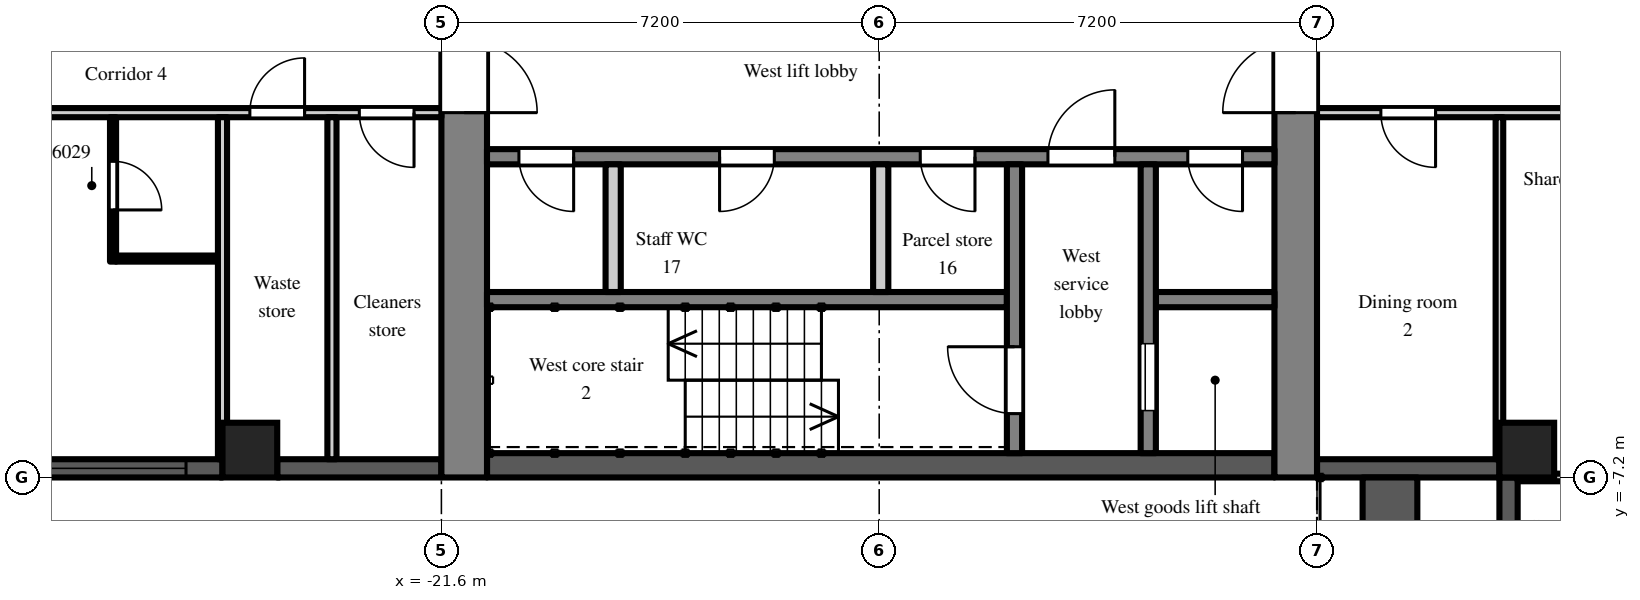
"""IFC4 building model, lengths in metres.
Left out: names, types, materials, properties, quantities, classifications, styles, units other than length and angle.
Written with IfcOpenShell. Run it as: python <this file> out.ifc"""

import sys

from ifc_helpers import new_model, si_unit, direction, frame, frame_2d, origin, origin_2d, place, context, subcontext, project, spatial, rectangle, extrude, element, fill, save


model = new_model("IFC4")
c1 = context("Model", 3, precision=1e-05, world=origin(), true_north=direction((0.0, 1.0)))
c2 = subcontext(c1, "Body", "Model", "MODEL_VIEW")
j1 = project(units=[si_unit("LENGTHUNIT", "METRE"), si_unit("PLANEANGLEUNIT", "RADIAN")], contexts=[c1])
p1 = place(None, origin())
s1 = spatial("IfcSite", under=j1, at=p1, CompositionType="ELEMENT")
p2 = place(p1, origin())
s2 = spatial("IfcBuilding", under=s1, at=p2, CompositionType="ELEMENT")
p3 = place(p2, frame((0.0, 0.0, 179.7)))
s3 = spatial("IfcBuildingStorey", under=s2, at=p3, CompositionType="ELEMENT", Elevation=179.7)
for number, where, z_axis, x_axis in (
    (1, (-24.75, -6.75, 0.0), (0.0, 0.0, 1.0), (1.0, 0.0, 0.0)),
    (2, (-3.75, -6.75, 0.0), (0.0, 0.0, 1.0), (1.0, 0.0, 0.0)),
):
    element("IfcColumn", number, at=place(p3, frame(where, z_axis=z_axis, x_axis=x_axis)), inside=s3, PredefinedType="COLUMN", context=c2, shape_type="SweptSolid", body=[
        extrude(rectangle(XDim=0.9, YDim=0.9, at=origin_2d()), origin(), (0.0, 0.0, 1.0), 3.0),
    ])
p4 = place(p3, frame((-28.35, -7.05, 0.0), z_axis=(0.0, 0.0, 1.0), x_axis=(1.0, 0.0, 0.0)))
e3 = element("IfcWall", 3, at=p4, inside=s3, PredefinedType="SOLIDWALL", context=c2, shape_type="SweptSolid", body=[
    extrude(rectangle(XDim=3.15, YDim=0.3, at=frame_2d((1.575, 0.0))), origin(), (0.0, 0.0, 1.0), 2.2),
])
p5 = place(p4, frame((0.15, 0.0, 0.2)))
e4 = element("IfcOpeningElement", 4, at=p5, cuts=e3, PredefinedType="OPENING", context=c2, shape_type="SweptSolid", body=[
    extrude(rectangle(XDim=2.4, YDim=1.85, at=frame_2d((1.2, 0.925))), frame((0.0, 0.16, 0.0), z_axis=(0.0, -1.0, 0.0), x_axis=(1.0, 0.0, 0.0)), (0.0, 0.0, 1.0), 0.32),
])
p6 = place(p3, frame((-24.3, -7.05, 0.0), z_axis=(0.0, 0.0, 1.0), x_axis=(1.0, 0.0, 0.0)))
e5 = element("IfcWall", 5, at=p6, inside=s3, PredefinedType="SOLIDWALL", context=c2, shape_type="SweptSolid", body=[
    extrude(rectangle(XDim=2.7, YDim=0.3, at=frame_2d((1.35, 0.0))), origin(), (0.0, 0.0, 1.0), 2.2),
])
p7 = place(p3, frame((-7.2, -7.05, 0.0), z_axis=(0.0, 0.0, 1.0), x_axis=(1.0, 0.0, 0.0)))
e6 = element("IfcWall", 6, at=p7, inside=s3, PredefinedType="SOLIDWALL", context=c2, shape_type="SweptSolid", body=[
    extrude(rectangle(XDim=3.0, YDim=0.3, at=frame_2d((1.5, 0.0))), origin(), (0.0, 0.0, 1.0), 2.2),
])
p8 = place(p3, frame((-4.05, -7.2, 0.0), z_axis=(0.0, 0.0, 1.0), x_axis=(0.0, -1.0, 0.0)))
e7 = element("IfcWall", 7, at=p8, inside=s3, PredefinedType="SOLIDWALL", context=c2, shape_type="SweptSolid", body=[
    extrude(rectangle(XDim=7.2, YDim=0.3, at=frame_2d((3.6, 0.0))), origin(), (0.0, 0.0, 1.0), 2.2),
])
p9 = place(p8, frame((3.0, 0.0, 0.0)))
e8 = element("IfcOpeningElement", 8, at=p9, cuts=e7, PredefinedType="OPENING", context=c2, shape_type="SweptSolid", body=[
    extrude(rectangle(XDim=1.2, YDim=2.05, at=frame_2d((0.6, 1.025))), frame((0.0, 0.16, 0.0), z_axis=(0.0, -1.0, 0.0), x_axis=(1.0, 0.0, 0.0)), (0.0, 0.0, 1.0), 0.32),
])
p10 = place(p8, frame((0.9, 0.0, 0.2)))
e9 = element("IfcOpeningElement", 9, at=p10, cuts=e7, PredefinedType="OPENING", context=c2, shape_type="SweptSolid", body=[
    extrude(rectangle(XDim=1.8, YDim=1.85, at=frame_2d((0.9, 0.925))), frame((0.0, 0.16, 0.0), z_axis=(0.0, -1.0, 0.0), x_axis=(1.0, 0.0, 0.0)), (0.0, 0.0, 1.0), 0.32),
])
p11 = place(p8, frame((4.5, 0.0, 0.2)))
e10 = element("IfcOpeningElement", 10, at=p11, cuts=e7, PredefinedType="OPENING", context=c2, shape_type="SweptSolid", body=[
    extrude(rectangle(XDim=1.8, YDim=1.85, at=frame_2d((0.9, 0.925))), frame((0.0, 0.16, 0.0), z_axis=(0.0, -1.0, 0.0), x_axis=(1.0, 0.0, 0.0)), (0.0, 0.0, 1.0), 0.32),
])
p12 = place(p3, frame((-6.0, -14.4, 0.0), z_axis=(0.0, 0.0, 1.0), x_axis=(0.0, 1.0, 0.0)))
e11 = element("IfcWall", 11, at=p12, inside=s3, PredefinedType="PARAPET", context=c2, shape_type="SweptSolid", body=[
    extrude(rectangle(XDim=7.2, YDim=0.9, at=frame_2d((3.6, 0.0))), origin(), (0.0, 0.0, 1.0), 0.8),
])
p13 = place(p3, frame((-7.55, -7.2, 0.0), z_axis=(0.0, 0.0, 1.0), x_axis=(0.0, 1.0, 0.0)))
e12 = element("IfcWall", 12, at=p13, inside=s3, PredefinedType="SHEAR", context=c2, shape_type="SweptSolid", body=[
    extrude(rectangle(XDim=14.4, YDim=0.7, at=frame_2d((7.2, 0.0))), origin(), (0.0, 0.0, 1.0), 2.6),
])
p14 = place(p13, frame((6.0, 0.0, 0.0)))
e13 = element("IfcOpeningElement", 13, at=p14, cuts=e12, PredefinedType="OPENING", context=c2, shape_type="SweptSolid", body=[
    extrude(rectangle(XDim=2.4, YDim=2.2, at=frame_2d((1.2, 1.1))), frame((0.0, 0.36, 0.0), z_axis=(0.0, -1.0, 0.0), x_axis=(1.0, 0.0, 0.0)), (0.0, 0.0, 1.0), 0.72),
])
p15 = place(p3, frame((-21.225, -7.2, 0.0), z_axis=(0.0, 0.0, 1.0), x_axis=(0.0, 1.0, 0.0)))
e14 = element("IfcWall", 14, at=p15, inside=s3, PredefinedType="SHEAR", context=c2, shape_type="SweptSolid", body=[
    extrude(rectangle(XDim=14.4, YDim=0.75, at=frame_2d((7.2, 0.0))), origin(), (0.0, 0.0, 1.0), 2.6),
])
p16 = place(p15, frame((6.0, 0.0, 0.0)))
e15 = element("IfcOpeningElement", 15, at=p16, cuts=e14, PredefinedType="OPENING", context=c2, shape_type="SweptSolid", body=[
    extrude(rectangle(XDim=2.4, YDim=2.2, at=frame_2d((1.2, 1.1))), frame((0.0, 0.385, 0.0), z_axis=(0.0, -1.0, 0.0), x_axis=(1.0, 0.0, 0.0)), (0.0, 0.0, 1.0), 0.77),
])
p17 = place(p3, frame((-7.9, -7.0, 0.0), z_axis=(0.0, 0.0, 1.0), x_axis=(-1.0, 0.0, 0.0)))
e16 = element("IfcWall", 16, at=p17, inside=s3, PredefinedType="SHEAR", context=c2, shape_type="SweptSolid", body=[
    extrude(rectangle(XDim=12.95, YDim=0.4, at=frame_2d((6.475, 0.0))), origin(), (0.0, 0.0, 1.0), 2.6),
])
p18 = place(p3, frame((-7.9, -1.925, 0.0), z_axis=(0.0, 0.0, 1.0), x_axis=(-1.0, 0.0, 0.0)))
e17 = element("IfcWall", 17, at=p18, inside=s3, PredefinedType="SHEAR", context=c2, shape_type="SweptSolid", body=[
    extrude(rectangle(XDim=12.95, YDim=0.25, at=frame_2d((6.475, 0.0))), origin(), (0.0, 0.0, 1.0), 2.6),
])
p19 = place(p18, frame((0.525, 0.0, 0.0)))
e18 = element("IfcOpeningElement", 18, at=p19, cuts=e17, PredefinedType="OPENING", context=c2, shape_type="SweptSolid", body=[
    extrude(rectangle(XDim=0.9, YDim=2.1, at=frame_2d((0.45, 1.05))), frame((0.0, 0.135, 0.0), z_axis=(0.0, -1.0, 0.0), x_axis=(1.0, 0.0, 0.0)), (0.0, 0.0, 1.0), 0.27),
])
p20 = place(p18, frame((2.625, 0.0, 0.0)))
e19 = element("IfcOpeningElement", 19, at=p20, cuts=e17, PredefinedType="OPENING", context=c2, shape_type="SweptSolid", body=[
    extrude(rectangle(XDim=1.1, YDim=2.1, at=frame_2d((0.55, 1.05))), frame((0.0, 0.135, 0.0), z_axis=(0.0, -1.0, 0.0), x_axis=(1.0, 0.0, 0.0)), (0.0, 0.0, 1.0), 0.27),
])
p21 = place(p18, frame((4.925, 0.0, 0.0)))
e20 = element("IfcOpeningElement", 20, at=p21, cuts=e17, PredefinedType="OPENING", context=c2, shape_type="SweptSolid", body=[
    extrude(rectangle(XDim=0.9, YDim=2.1, at=frame_2d((0.45, 1.05))), frame((0.0, 0.135, 0.0), z_axis=(0.0, -1.0, 0.0), x_axis=(1.0, 0.0, 0.0)), (0.0, 0.0, 1.0), 0.27),
])
p22 = place(p18, frame((8.225, 0.0, 0.0)))
e21 = element("IfcOpeningElement", 21, at=p22, cuts=e17, PredefinedType="OPENING", context=c2, shape_type="SweptSolid", body=[
    extrude(rectangle(XDim=0.9, YDim=2.1, at=frame_2d((0.45, 1.05))), frame((0.0, 0.135, 0.0), z_axis=(0.0, -1.0, 0.0), x_axis=(1.0, 0.0, 0.0)), (0.0, 0.0, 1.0), 0.27),
])
p23 = place(p18, frame((11.525, 0.0, 0.0)))
e22 = element("IfcOpeningElement", 22, at=p23, cuts=e17, PredefinedType="OPENING", context=c2, shape_type="SweptSolid", body=[
    extrude(rectangle(XDim=0.9, YDim=2.1, at=frame_2d((0.45, 1.05))), frame((0.0, 0.135, 0.0), z_axis=(0.0, -1.0, 0.0), x_axis=(1.0, 0.0, 0.0)), (0.0, 0.0, 1.0), 0.27),
])
p24 = place(p3, frame((-7.9, -4.275, 0.0), z_axis=(0.0, 0.0, 1.0), x_axis=(-1.0, 0.0, 0.0)))
e23 = element("IfcWall", 23, at=p24, inside=s3, PredefinedType="SHEAR", context=c2, shape_type="SweptSolid", body=[
    extrude(rectangle(XDim=1.95, YDim=0.25, at=frame_2d((0.975, 0.0))), origin(), (0.0, 0.0, 1.0), 2.6),
])
p25 = place(p3, frame((-12.3, -4.275, 0.0), z_axis=(0.0, 0.0, 1.0), x_axis=(-1.0, 0.0, 0.0)))
e24 = element("IfcWall", 24, at=p25, inside=s3, PredefinedType="SHEAR", context=c2, shape_type="SweptSolid", body=[
    extrude(rectangle(XDim=8.55, YDim=0.25, at=frame_2d((4.275, 0.0))), origin(), (0.0, 0.0, 1.0), 2.6),
])
p26 = place(p3, frame((-9.975, -2.05, 0.0), z_axis=(0.0, 0.0, 1.0), x_axis=(0.0, -1.0, 0.0)))
e25 = element("IfcWall", 25, at=p26, inside=s3, PredefinedType="SHEAR", context=c2, shape_type="SweptSolid", body=[
    extrude(rectangle(XDim=4.75, YDim=0.25, at=frame_2d((2.375, 0.0))), origin(), (0.0, 0.0, 1.0), 2.6),
])
p27 = place(p26, frame((2.95, 0.0, 0.0)))
e26 = element("IfcOpeningElement", 26, at=p27, cuts=e25, PredefinedType="OPENING", context=c2, shape_type="SweptSolid", body=[
    extrude(rectangle(XDim=1.1, YDim=2.1, at=frame_2d((0.55, 1.05))), frame((0.0, 0.135, 0.0), z_axis=(0.0, -1.0, 0.0), x_axis=(1.0, 0.0, 0.0)), (0.0, 0.0, 1.0), 0.27),
])
p28 = place(p3, frame((-12.175, -2.05, 0.0), z_axis=(0.0, 0.0, 1.0), x_axis=(0.0, -1.0, 0.0)))
e27 = element("IfcWall", 27, at=p28, inside=s3, PredefinedType="SHEAR", context=c2, shape_type="SweptSolid", body=[
    extrude(rectangle(XDim=4.75, YDim=0.25, at=frame_2d((2.375, 0.0))), origin(), (0.0, 0.0, 1.0), 2.6),
])
p29 = place(p28, frame((3.0, 0.0, 0.0)))
e28 = element("IfcOpeningElement", 28, at=p29, cuts=e27, PredefinedType="OPENING", context=c2, shape_type="SweptSolid", body=[
    extrude(rectangle(XDim=1.1, YDim=2.1, at=frame_2d((0.55, 1.05))), frame((0.0, 0.135, 0.0), z_axis=(0.0, -1.0, 0.0), x_axis=(1.0, 0.0, 0.0)), (0.0, 0.0, 1.0), 0.27),
])
for number, where, z_axis, x_axis in (
    (29, (-14.375, -2.05, 0.0), (0.0, 0.0, 1.0), (0.0, -1.0, 0.0)),
    (30, (-18.775, -2.05, 0.0), (0.0, 0.0, 1.0), (0.0, -1.0, 0.0)),
):
    element("IfcWall", number, at=place(p3, frame(where, z_axis=z_axis, x_axis=x_axis)), inside=s3, PredefinedType="PARTITIONING", context=c2, shape_type="SweptSolid", body=[
        extrude(rectangle(XDim=2.1, YDim=0.25, at=frame_2d((1.05, 0.0))), origin(), (0.0, 0.0, 1.0), 2.6),
    ])
p30 = place(p3, frame((-36.5, -1.2, 0.0), z_axis=(0.0, 0.0, 1.0), x_axis=(1.0, 0.0, 0.0)))
e31 = element("IfcWall", 31, at=p30, inside=s3, PredefinedType="PARTITIONING", context=c2, shape_type="SweptSolid", body=[
    extrude(rectangle(XDim=14.9, YDim=0.15, at=frame_2d((7.45, 0.0))), origin(), (0.0, 0.0, 1.0), 2.6),
])
p31 = place(p30, frame((13.55, 0.0, 0.0)))
e32 = element("IfcOpeningElement", 32, at=p31, cuts=e31, PredefinedType="OPENING", context=c2, shape_type="SweptSolid", body=[
    extrude(rectangle(XDim=0.9, YDim=2.1, at=frame_2d((0.45, 1.05))), frame((0.0, 0.085, 0.0), z_axis=(0.0, -1.0, 0.0), x_axis=(1.0, 0.0, 0.0)), (0.0, 0.0, 1.0), 0.17),
])
p32 = place(p30, frame((11.75, 0.0, 0.0)))
e33 = element("IfcOpeningElement", 33, at=p32, cuts=e31, PredefinedType="OPENING", context=c2, shape_type="SweptSolid", body=[
    extrude(rectangle(XDim=0.9, YDim=2.1, at=frame_2d((0.45, 1.05))), frame((0.0, 0.085, 0.0), z_axis=(0.0, -1.0, 0.0), x_axis=(1.0, 0.0, 0.0)), (0.0, 0.0, 1.0), 0.17),
])
p33 = place(p30, frame((4.41, 0.0, 0.0)))
e34 = element("IfcOpeningElement", 34, at=p33, cuts=e31, PredefinedType="OPENING", context=c2, shape_type="SweptSolid", body=[
    extrude(rectangle(XDim=1.0, YDim=2.1, at=frame_2d((0.5, 1.05))), frame((0.0, 0.085, 0.0), z_axis=(0.0, -1.0, 0.0), x_axis=(1.0, 0.0, 0.0)), (0.0, 0.0, 1.0), 0.17),
])
p34 = place(p30, frame((1.15, 0.0, 0.0)))
e35 = element("IfcOpeningElement", 35, at=p34, cuts=e31, PredefinedType="OPENING", context=c2, shape_type="SweptSolid", body=[
    extrude(rectangle(XDim=1.8, YDim=2.1, at=frame_2d((0.9, 1.05))), frame((0.0, 0.085, 0.0), z_axis=(0.0, -1.0, 0.0), x_axis=(1.0, 0.0, 0.0)), (0.0, 0.0, 1.0), 0.17),
])
p35 = place(p3, frame((-27.0, -3.65, 0.0), z_axis=(0.0, 0.0, 1.0), x_axis=(0.0, 1.0, 0.0)))
e36 = element("IfcWall", 36, at=p35, inside=s3, PredefinedType="PARTITIONING", context=c2, shape_type="SweptSolid", body=[
    extrude(rectangle(XDim=2.375, YDim=0.1, at=frame_2d((1.188, 0.0))), origin(), (0.0, 0.0, 1.0), 2.6),
])
p36 = place(p35, frame((0.85, 0.0, 0.0)))
e37 = element("IfcOpeningElement", 37, at=p36, cuts=e36, PredefinedType="OPENING", context=c2, shape_type="SweptSolid", body=[
    extrude(rectangle(XDim=0.8, YDim=2.1, at=frame_2d((0.4, 1.05))), frame((0.0, 0.06, 0.0), z_axis=(0.0, -1.0, 0.0), x_axis=(1.0, 0.0, 0.0)), (0.0, 0.0, 1.0), 0.12),
])
p37 = place(p3, frame((-26.95, -3.6, 0.0), z_axis=(0.0, 0.0, 1.0), x_axis=(1.0, 0.0, 0.0)))
e38 = element("IfcWall", 38, at=p37, inside=s3, PredefinedType="PARTITIONING", context=c2, shape_type="SweptSolid", body=[
    extrude(rectangle(XDim=1.675, YDim=0.1, at=frame_2d((0.837, 0.0))), origin(), (0.0, 0.0, 1.0), 2.6),
])
for number, where, z_axis, x_axis in (
    (39, (-25.2, -6.9, 0.0), (0.0, 0.0, 1.0), (0.0, 1.0, 0.0)),
    (40, (-23.4, -6.9, 0.0), (0.0, 0.0, 1.0), (0.0, 1.0, 0.0)),
):
    element("IfcWall", number, at=place(p3, frame(where, z_axis=z_axis, x_axis=x_axis)), inside=s3, PredefinedType="PARTITIONING", context=c2, shape_type="SweptSolid", body=[
        extrude(rectangle(XDim=5.625, YDim=0.15, at=frame_2d((2.812, 0.0))), origin(), (0.0, 0.0, 1.0), 2.6),
    ])
p38 = place(p3, frame((-7.2, -1.2, 0.0), z_axis=(0.0, 0.0, 1.0), x_axis=(1.0, 0.0, 0.0)))
e41 = element("IfcWall", 41, at=p38, inside=s3, PredefinedType="PARTITIONING", context=c2, shape_type="SweptSolid", body=[
    extrude(rectangle(XDim=6.075, YDim=0.15, at=frame_2d((3.038, 0.0))), origin(), (0.0, 0.0, 1.0), 2.6),
])
p39 = place(p38, frame((1.05, 0.0, 0.0)))
e42 = element("IfcOpeningElement", 42, at=p39, cuts=e41, PredefinedType="OPENING", context=c2, shape_type="SweptSolid", body=[
    extrude(rectangle(XDim=0.9, YDim=2.1, at=frame_2d((0.45, 1.05))), frame((0.0, 0.085, 0.0), z_axis=(0.0, -1.0, 0.0), x_axis=(1.0, 0.0, 0.0)), (0.0, 0.0, 1.0), 0.17),
])
p40 = place(p3, frame((-4.2, -6.9, 0.0), z_axis=(0.0, 0.0, 1.0), x_axis=(0.0, 1.0, 0.0)))
e43 = element("IfcWall", 43, at=p40, inside=s3, PredefinedType="PARTITIONING", context=c2, shape_type="SweptSolid", body=[
    extrude(rectangle(XDim=5.625, YDim=0.125, at=frame_2d((2.812, 0.0))), origin(), (0.0, 0.0, 1.0), 2.6),
])
p41 = place(p3, frame((-3.9, -7.2, 0.0), z_axis=(0.0, 0.0, 1.0), x_axis=(1.0, 0.0, 0.0)))
e44 = element("IfcWall", 44, at=p41, inside=s3, PredefinedType="PARTITIONING", context=c2, shape_type="SweptSolid", body=[
    extrude(rectangle(XDim=2.625, YDim=0.125, at=frame_2d((1.312, 0.0))), origin(), (0.0, 0.0, 1.0), 2.6),
])
p42 = place(p5, origin())
e45 = element("IfcWindow", 45, at=p42, inside=s3, PartitioningType="SINGLE_PANEL", PredefinedType="WINDOW", context=c2, shape_type="SweptSolid", body=[
    extrude(rectangle(XDim=2.4, YDim=1.85, at=frame_2d((1.2, 0.925))), frame((0.0, 0.03, 0.0), z_axis=(0.0, -1.0, 0.0), x_axis=(1.0, 0.0, 0.0)), (0.0, 0.0, 1.0), 0.06),
])
fill(e4, e45)
p43 = place(p27, origin())
e46 = element("IfcDoor", 46, at=p43, inside=s3, OperationType="SLIDING_TO_LEFT", PredefinedType="DOOR", context=c2, shape_type="SweptSolid", body=[
    extrude(rectangle(XDim=1.1, YDim=2.1, at=frame_2d((0.55, 1.05))), frame((0.0, 0.025, 0.0), z_axis=(0.0, -1.0, 0.0), x_axis=(1.0, 0.0, 0.0)), (0.0, 0.0, 1.0), 0.05),
])
fill(e26, e46)
p44 = place(p29, frame((1.1, 0.0, 0.0), z_axis=(0.0, 0.0, 1.0), x_axis=(-1.0, 0.0, 0.0)))
e47 = element("IfcDoor", 47, at=p44, inside=s3, OperationType="SINGLE_SWING_RIGHT", PredefinedType="DOOR", context=c2, shape_type="SweptSolid", body=[
    extrude(rectangle(XDim=1.1, YDim=2.1, at=frame_2d((0.55, 1.05))), frame((0.0, 0.025, 0.0), z_axis=(0.0, -1.0, 0.0), x_axis=(1.0, 0.0, 0.0)), (0.0, 0.0, 1.0), 0.05),
])
fill(e28, e47)
p45 = place(p19, origin())
e48 = element("IfcDoor", 48, at=p45, inside=s3, OperationType="SINGLE_SWING_LEFT", PredefinedType="DOOR", context=c2, shape_type="SweptSolid", body=[
    extrude(rectangle(XDim=0.9, YDim=2.1, at=frame_2d((0.45, 1.05))), frame((0.0, 0.025, 0.0), z_axis=(0.0, -1.0, 0.0), x_axis=(1.0, 0.0, 0.0)), (0.0, 0.0, 1.0), 0.05),
])
fill(e18, e48)
p46 = place(p20, frame((1.1, 0.0, 0.0), z_axis=(0.0, 0.0, 1.0), x_axis=(-1.0, 0.0, 0.0)))
e49 = element("IfcDoor", 49, at=p46, inside=s3, OperationType="SINGLE_SWING_RIGHT", PredefinedType="DOOR", context=c2, shape_type="SweptSolid", body=[
    extrude(rectangle(XDim=1.1, YDim=2.1, at=frame_2d((0.55, 1.05))), frame((0.0, 0.025, 0.0), z_axis=(0.0, -1.0, 0.0), x_axis=(1.0, 0.0, 0.0)), (0.0, 0.0, 1.0), 0.05),
])
fill(e19, e49)
p47 = place(p14, origin())
e50 = element("IfcDoor", 50, at=p47, inside=s3, OperationType="DOUBLE_DOOR_DOUBLE_SWING", PredefinedType="DOOR", context=c2, shape_type="SweptSolid", body=[
    extrude(rectangle(XDim=2.4, YDim=2.2, at=frame_2d((1.2, 1.1))), frame((0.0, 0.025, 0.0), z_axis=(0.0, -1.0, 0.0), x_axis=(1.0, 0.0, 0.0)), (0.0, 0.0, 1.0), 0.05),
])
fill(e13, e50)
p48 = place(p16, frame((2.4, 0.0, 0.0), z_axis=(0.0, 0.0, 1.0), x_axis=(-1.0, 0.0, 0.0)))
e51 = element("IfcDoor", 51, at=p48, inside=s3, OperationType="DOUBLE_DOOR_DOUBLE_SWING", PredefinedType="DOOR", context=c2, shape_type="SweptSolid", body=[
    extrude(rectangle(XDim=2.4, YDim=2.2, at=frame_2d((1.2, 1.1))), frame((0.0, 0.025, 0.0), z_axis=(0.0, -1.0, 0.0), x_axis=(1.0, 0.0, 0.0)), (0.0, 0.0, 1.0), 0.05),
])
fill(e15, e51)
p49 = place(p21, origin())
e52 = element("IfcDoor", 52, at=p49, inside=s3, OperationType="SINGLE_SWING_LEFT", PredefinedType="DOOR", context=c2, shape_type="SweptSolid", body=[
    extrude(rectangle(XDim=0.9, YDim=2.1, at=frame_2d((0.45, 1.05))), frame((0.0, 0.025, 0.0), z_axis=(0.0, -1.0, 0.0), x_axis=(1.0, 0.0, 0.0)), (0.0, 0.0, 1.0), 0.05),
])
fill(e20, e52)
p50 = place(p22, origin())
e53 = element("IfcDoor", 53, at=p50, inside=s3, OperationType="SINGLE_SWING_RIGHT", PredefinedType="DOOR", context=c2, shape_type="SweptSolid", body=[
    extrude(rectangle(XDim=0.9, YDim=2.1, at=frame_2d((0.45, 1.05))), frame((0.0, 0.025, 0.0), z_axis=(0.0, -1.0, 0.0), x_axis=(1.0, 0.0, 0.0)), (0.0, 0.0, 1.0), 0.05),
])
fill(e21, e53)
p51 = place(p23, origin())
e54 = element("IfcDoor", 54, at=p51, inside=s3, OperationType="SINGLE_SWING_LEFT", PredefinedType="DOOR", context=c2, shape_type="SweptSolid", body=[
    extrude(rectangle(XDim=0.9, YDim=2.1, at=frame_2d((0.45, 1.05))), frame((0.0, 0.025, 0.0), z_axis=(0.0, -1.0, 0.0), x_axis=(1.0, 0.0, 0.0)), (0.0, 0.0, 1.0), 0.05),
])
fill(e22, e54)
p52 = place(p39, frame((0.9, 0.0, 0.0), z_axis=(0.0, 0.0, 1.0), x_axis=(-1.0, 0.0, 0.0)))
e55 = element("IfcDoor", 55, at=p52, inside=s3, OperationType="SINGLE_SWING_LEFT", PredefinedType="DOOR", context=c2, shape_type="SweptSolid", body=[
    extrude(rectangle(XDim=0.9, YDim=2.1, at=frame_2d((0.45, 1.05))), frame((0.0, 0.025, 0.0), z_axis=(0.0, -1.0, 0.0), x_axis=(1.0, 0.0, 0.0)), (0.0, 0.0, 1.0), 0.05),
])
fill(e42, e55)
p53 = place(p31, frame((0.9, 0.0, 0.0), z_axis=(0.0, 0.0, 1.0), x_axis=(-1.0, 0.0, 0.0)))
e56 = element("IfcDoor", 56, at=p53, inside=s3, OperationType="SINGLE_SWING_LEFT", PredefinedType="DOOR", context=c2, shape_type="SweptSolid", body=[
    extrude(rectangle(XDim=0.9, YDim=2.1, at=frame_2d((0.45, 1.05))), frame((0.0, 0.025, 0.0), z_axis=(0.0, -1.0, 0.0), x_axis=(1.0, 0.0, 0.0)), (0.0, 0.0, 1.0), 0.05),
])
fill(e32, e56)
p54 = place(p32, origin())
e57 = element("IfcDoor", 57, at=p54, inside=s3, OperationType="SINGLE_SWING_RIGHT", PredefinedType="DOOR", context=c2, shape_type="SweptSolid", body=[
    extrude(rectangle(XDim=0.9, YDim=2.1, at=frame_2d((0.45, 1.05))), frame((0.0, 0.025, 0.0), z_axis=(0.0, -1.0, 0.0), x_axis=(1.0, 0.0, 0.0)), (0.0, 0.0, 1.0), 0.05),
])
fill(e33, e57)
p55 = place(p36, frame((0.8, 0.0, 0.0), z_axis=(0.0, 0.0, 1.0), x_axis=(-1.0, 0.0, 0.0)))
e58 = element("IfcDoor", 58, at=p55, inside=s3, OperationType="SINGLE_SWING_RIGHT", PredefinedType="DOOR", context=c2, shape_type="SweptSolid", body=[
    extrude(rectangle(XDim=0.8, YDim=2.1, at=frame_2d((0.4, 1.05))), frame((0.0, 0.025, 0.0), z_axis=(0.0, -1.0, 0.0), x_axis=(1.0, 0.0, 0.0)), (0.0, 0.0, 1.0), 0.05),
])
fill(e37, e58)
save(model, sys.argv[1])
